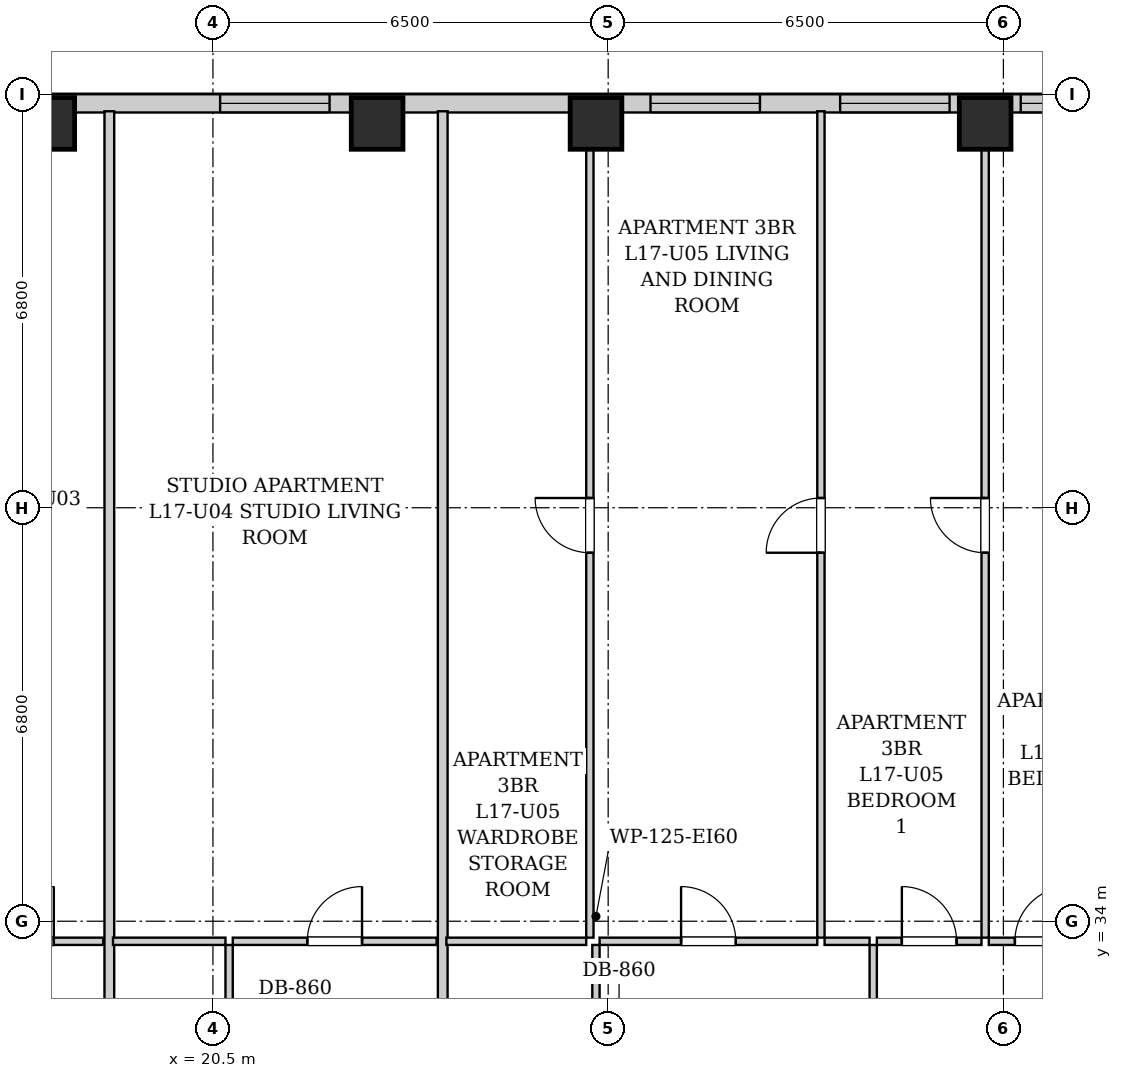
"""IFC4 building model, lengths in metres.
Left out: names, types, materials, properties, quantities, classifications, styles, units other than length and angle.
Written with IfcOpenShell. Run it as: python <this file> out.ifc"""

import sys

from ifc_helpers import new_model, si_unit, direction, frame, frame_2d, origin, origin_2d, place, context, subcontext, project, spatial, rectangle, extrude, element, fill, save


model = new_model("IFC4")
c1 = context("Model", 3, precision=1e-05, world=origin(), true_north=direction((0.0, 1.0)))
c2 = subcontext(c1, "Body", "Model", "MODEL_VIEW")
j1 = project(units=[si_unit("LENGTHUNIT", "METRE"), si_unit("PLANEANGLEUNIT", "RADIAN")], contexts=[c1])
p1 = place(None, origin())
s1 = spatial("IfcSite", under=j1, at=p1, CompositionType="ELEMENT")
p2 = place(p1, origin())
s2 = spatial("IfcBuilding", under=s1, at=p2, CompositionType="ELEMENT")
p3 = place(p2, frame((0.0, 0.0, 64.2)))
s3 = spatial("IfcBuildingStorey", under=s2, at=p3, CompositionType="ELEMENT", Elevation=64.2)
for number, where, z_axis, x_axis in (
    (1, (17.8, 47.12, 0.0), (0.0, 0.0, 1.0), (1.0, 0.0, 0.0)),
    (2, (23.2, 47.12, 0.0), (0.0, 0.0, 1.0), (1.0, 0.0, 0.0)),
    (3, (26.8, 47.12, 0.0), (0.0, 0.0, 1.0), (1.0, 0.0, 0.0)),
    (4, (33.2, 47.12, 0.0), (0.0, 0.0, 1.0), (1.0, 0.0, 0.0)),
):
    element("IfcColumn", number, at=place(p3, frame(where, z_axis=z_axis, x_axis=x_axis)), inside=s3, PredefinedType="COLUMN", context=c2, shape_type="SweptSolid", body=[
        extrude(rectangle(XDim=0.85, YDim=0.85, at=origin_2d()), origin(), (0.0, 0.0, 1.0), 3.2),
    ])
p4 = place(p3, frame((10.0, 47.45, 0.0), z_axis=(0.0, 0.0, 1.0), x_axis=(1.0, 0.0, 0.0)))
e5 = element("IfcWall", 5, at=p4, inside=s3, PredefinedType="SOLIDWALL", context=c2, shape_type="SweptSolid", body=[
    extrude(rectangle(XDim=26.35, YDim=0.3, at=frame_2d((13.175, 0.0))), origin(), (0.0, 0.0, 1.0), 1.975),
])
p5 = place(p4, frame((1.735, 0.0, 0.55)))
e6 = element("IfcOpeningElement", 6, at=p5, cuts=e5, PredefinedType="OPENING", context=c2, shape_type="SweptSolid", body=[
    extrude(rectangle(XDim=1.8, YDim=1.2, at=frame_2d((0.9, 0.6))), frame((0.0, 0.16, 0.0), z_axis=(0.0, -1.0, 0.0), x_axis=(1.0, 0.0, 0.0)), (0.0, 0.0, 1.0), 0.32),
])
p6 = place(p4, frame((5.415, 0.0, 0.55)))
e7 = element("IfcOpeningElement", 7, at=p6, cuts=e5, PredefinedType="OPENING", context=c2, shape_type="SweptSolid", body=[
    extrude(rectangle(XDim=1.8, YDim=1.2, at=frame_2d((0.9, 0.6))), frame((0.0, 0.16, 0.0), z_axis=(0.0, -1.0, 0.0), x_axis=(1.0, 0.0, 0.0)), (0.0, 0.0, 1.0), 0.32),
])
p7 = place(p4, frame((10.618, 0.0, 0.55)))
e8 = element("IfcOpeningElement", 8, at=p7, cuts=e5, PredefinedType="OPENING", context=c2, shape_type="SweptSolid", body=[
    extrude(rectangle(XDim=1.8, YDim=1.2, at=frame_2d((0.9, 0.6))), frame((0.0, 0.16, 0.0), z_axis=(0.0, -1.0, 0.0), x_axis=(1.0, 0.0, 0.0)), (0.0, 0.0, 1.0), 0.32),
])
p8 = place(p4, frame((17.696, 0.0, 0.55)))
e9 = element("IfcOpeningElement", 9, at=p8, cuts=e5, PredefinedType="OPENING", context=c2, shape_type="SweptSolid", body=[
    extrude(rectangle(XDim=1.8, YDim=1.2, at=frame_2d((0.9, 0.6))), frame((0.0, 0.16, 0.0), z_axis=(0.0, -1.0, 0.0), x_axis=(1.0, 0.0, 0.0)), (0.0, 0.0, 1.0), 0.32),
])
p9 = place(p4, frame((20.815, 0.0, 0.55)))
e10 = element("IfcOpeningElement", 10, at=p9, cuts=e5, PredefinedType="OPENING", context=c2, shape_type="SweptSolid", body=[
    extrude(rectangle(XDim=1.8, YDim=1.2, at=frame_2d((0.9, 0.6))), frame((0.0, 0.16, 0.0), z_axis=(0.0, -1.0, 0.0), x_axis=(1.0, 0.0, 0.0)), (0.0, 0.0, 1.0), 0.32),
])
p10 = place(p4, frame((23.785, 0.0, 0.55)))
e11 = element("IfcOpeningElement", 11, at=p10, cuts=e5, PredefinedType="OPENING", context=c2, shape_type="SweptSolid", body=[
    extrude(rectangle(XDim=1.35, YDim=1.2, at=frame_2d((0.675, 0.6))), frame((0.0, 0.16, 0.0), z_axis=(0.0, -1.0, 0.0), x_axis=(1.0, 0.0, 0.0)), (0.0, 0.0, 1.0), 0.32),
])
p11 = place(p3, frame((16.17, 33.67, 0.0), z_axis=(0.0, 0.0, 1.0), x_axis=(1.0, 0.0, 0.0)))
e12 = element("IfcWall", 12, at=p11, inside=s3, PredefinedType="PARTITIONING", context=c2, shape_type="SweptSolid", body=[
    extrude(rectangle(XDim=2.526, YDim=0.12, at=frame_2d((1.263, 0.0))), origin(), (0.0, 0.0, 1.0), 2.94),
])
p12 = place(p11, frame((0.813, 0.0, 0.0)))
e13 = element("IfcOpeningElement", 13, at=p12, cuts=e12, PredefinedType="OPENING", context=c2, shape_type="SweptSolid", body=[
    extrude(rectangle(XDim=0.9, YDim=2.05, at=frame_2d((0.45, 1.025))), frame((0.0, 0.07, 0.0), z_axis=(0.0, -1.0, 0.0), x_axis=(1.0, 0.0, 0.0)), (0.0, 0.0, 1.0), 0.14),
])
p13 = place(p3, frame((18.796, 30.76, 0.0), z_axis=(0.0, 0.0, 1.0), x_axis=(0.0, 1.0, 0.0)))
e14 = element("IfcWall", 14, at=p13, inside=s3, PredefinedType="PARTITIONING", context=c2, shape_type="SweptSolid", body=[
    extrude(rectangle(XDim=16.56, YDim=0.16, at=frame_2d((8.28, 0.0))), origin(), (0.0, 0.0, 1.0), 2.94),
])
p14 = place(p3, frame((20.766, 30.76, 0.0), z_axis=(0.0, 0.0, 1.0), x_axis=(0.0, 1.0, 0.0)))
e15 = element("IfcWall", 15, at=p14, inside=s3, PredefinedType="PARTITIONING", context=c2, shape_type="SweptSolid", body=[
    extrude(rectangle(XDim=2.85, YDim=0.12, at=frame_2d((1.425, 0.0))), origin(), (0.0, 0.0, 1.0), 2.94),
])
p15 = place(p14, frame((0.995, 0.0, 0.0)))
e16 = element("IfcOpeningElement", 16, at=p15, cuts=e15, PredefinedType="OPENING", context=c2, shape_type="SweptSolid", body=[
    extrude(rectangle(XDim=0.86, YDim=2.05, at=frame_2d((0.43, 1.025))), frame((0.0, 0.07, 0.0), z_axis=(0.0, -1.0, 0.0), x_axis=(1.0, 0.0, 0.0)), (0.0, 0.0, 1.0), 0.14),
])
p16 = place(p3, frame((18.856, 33.67, 0.0), z_axis=(0.0, 0.0, 1.0), x_axis=(1.0, 0.0, 0.0)))
e17 = element("IfcWall", 17, at=p16, inside=s3, PredefinedType="PARTITIONING", context=c2, shape_type="SweptSolid", body=[
    extrude(rectangle(XDim=1.85, YDim=0.12, at=frame_2d((0.925, 0.0))), origin(), (0.0, 0.0, 1.0), 2.94),
])
p17 = place(p3, frame((20.826, 33.67, 0.0), z_axis=(0.0, 0.0, 1.0), x_axis=(1.0, 0.0, 0.0)))
e18 = element("IfcWall", 18, at=p17, inside=s3, PredefinedType="PARTITIONING", context=c2, shape_type="SweptSolid", body=[
    extrude(rectangle(XDim=3.353, YDim=0.12, at=frame_2d((1.677, 0.0))), origin(), (0.0, 0.0, 1.0), 2.94),
])
p18 = place(p17, frame((1.226, 0.0, 0.0)))
e19 = element("IfcOpeningElement", 19, at=p18, cuts=e18, PredefinedType="OPENING", context=c2, shape_type="SweptSolid", body=[
    extrude(rectangle(XDim=0.9, YDim=2.05, at=frame_2d((0.45, 1.025))), frame((0.0, 0.07, 0.0), z_axis=(0.0, -1.0, 0.0), x_axis=(1.0, 0.0, 0.0)), (0.0, 0.0, 1.0), 0.14),
])
p19 = place(p3, frame((24.279, 30.76, 0.0), z_axis=(0.0, 0.0, 1.0), x_axis=(0.0, 1.0, 0.0)))
e20 = element("IfcWall", 20, at=p19, inside=s3, PredefinedType="PARTITIONING", context=c2, shape_type="SweptSolid", body=[
    extrude(rectangle(XDim=16.56, YDim=0.16, at=frame_2d((8.28, 0.0))), origin(), (0.0, 0.0, 1.0), 2.94),
])
p20 = place(p3, frame((26.799, 30.76, 0.0), z_axis=(0.0, 0.0, 1.0), x_axis=(0.0, 1.0, 0.0)))
e21 = element("IfcWall", 21, at=p20, inside=s3, PredefinedType="PARTITIONING", context=c2, shape_type="SweptSolid", body=[
    extrude(rectangle(XDim=2.85, YDim=0.12, at=frame_2d((1.425, 0.0))), origin(), (0.0, 0.0, 1.0), 2.94),
])
p21 = place(p20, frame((0.995, 0.0, 0.0)))
e22 = element("IfcOpeningElement", 22, at=p21, cuts=e21, PredefinedType="OPENING", context=c2, shape_type="SweptSolid", body=[
    extrude(rectangle(XDim=0.86, YDim=2.05, at=frame_2d((0.43, 1.025))), frame((0.0, 0.07, 0.0), z_axis=(0.0, -1.0, 0.0), x_axis=(1.0, 0.0, 0.0)), (0.0, 0.0, 1.0), 0.14),
])
p22 = place(p3, frame((24.339, 33.67, 0.0), z_axis=(0.0, 0.0, 1.0), x_axis=(1.0, 0.0, 0.0)))
e23 = element("IfcWall", 23, at=p22, inside=s3, PredefinedType="PARTITIONING", context=c2, shape_type="SweptSolid", body=[
    extrude(rectangle(XDim=2.3, YDim=0.12, at=frame_2d((1.15, 0.0))), origin(), (0.0, 0.0, 1.0), 2.94),
])
p23 = place(p3, frame((31.359, 30.76, 0.0), z_axis=(0.0, 0.0, 1.0), x_axis=(0.0, 1.0, 0.0)))
e24 = element("IfcWall", 24, at=p23, inside=s3, PredefinedType="PARTITIONING", context=c2, shape_type="SweptSolid", body=[
    extrude(rectangle(XDim=2.85, YDim=0.12, at=frame_2d((1.425, 0.0))), origin(), (0.0, 0.0, 1.0), 2.94),
])
p24 = place(p23, frame((0.975, 0.0, 0.0)))
e25 = element("IfcOpeningElement", 25, at=p24, cuts=e24, PredefinedType="OPENING", context=c2, shape_type="SweptSolid", body=[
    extrude(rectangle(XDim=0.9, YDim=2.05, at=frame_2d((0.45, 1.025))), frame((0.0, 0.07, 0.0), z_axis=(0.0, -1.0, 0.0), x_axis=(1.0, 0.0, 0.0)), (0.0, 0.0, 1.0), 0.14),
])
p25 = place(p3, frame((26.859, 33.67, 0.0), z_axis=(0.0, 0.0, 1.0), x_axis=(1.0, 0.0, 0.0)))
e26 = element("IfcWall", 26, at=p25, inside=s3, PredefinedType="PARTITIONING", context=c2, shape_type="SweptSolid", body=[
    extrude(rectangle(XDim=3.58, YDim=0.12, at=frame_2d((1.79, 0.0))), origin(), (0.0, 0.0, 1.0), 2.94),
])
p26 = place(p25, frame((1.34, 0.0, 0.0)))
e27 = element("IfcOpeningElement", 27, at=p26, cuts=e26, PredefinedType="OPENING", context=c2, shape_type="SweptSolid", body=[
    extrude(rectangle(XDim=0.9, YDim=2.05, at=frame_2d((0.45, 1.025))), frame((0.0, 0.07, 0.0), z_axis=(0.0, -1.0, 0.0), x_axis=(1.0, 0.0, 0.0)), (0.0, 0.0, 1.0), 0.14),
])
p27 = place(p3, frame((30.559, 33.67, 0.0), z_axis=(0.0, 0.0, 1.0), x_axis=(1.0, 0.0, 0.0)))
e28 = element("IfcWall", 28, at=p27, inside=s3, PredefinedType="PARTITIONING", context=c2, shape_type="SweptSolid", body=[
    extrude(rectangle(XDim=0.74, YDim=0.12, at=frame_2d((0.37, 0.0))), origin(), (0.0, 0.0, 1.0), 2.94),
])
p28 = place(p3, frame((31.419, 33.67, 0.0), z_axis=(0.0, 0.0, 1.0), x_axis=(1.0, 0.0, 0.0)))
e29 = element("IfcWall", 29, at=p28, inside=s3, PredefinedType="PARTITIONING", context=c2, shape_type="SweptSolid", body=[
    extrude(rectangle(XDim=1.721, YDim=0.12, at=frame_2d((0.86, 0.0))), origin(), (0.0, 0.0, 1.0), 2.94),
])
p29 = place(p28, frame((0.411, 0.0, 0.0)))
e30 = element("IfcOpeningElement", 30, at=p29, cuts=e29, PredefinedType="OPENING", context=c2, shape_type="SweptSolid", body=[
    extrude(rectangle(XDim=0.9, YDim=2.05, at=frame_2d((0.45, 1.025))), frame((0.0, 0.07, 0.0), z_axis=(0.0, -1.0, 0.0), x_axis=(1.0, 0.0, 0.0)), (0.0, 0.0, 1.0), 0.14),
])
p30 = place(p3, frame((33.26, 33.67, 0.0), z_axis=(0.0, 0.0, 1.0), x_axis=(1.0, 0.0, 0.0)))
e31 = element("IfcWall", 31, at=p30, inside=s3, PredefinedType="PARTITIONING", context=c2, shape_type="SweptSolid", body=[
    extrude(rectangle(XDim=1.759, YDim=0.12, at=frame_2d((0.879, 0.0))), origin(), (0.0, 0.0, 1.0), 2.94),
])
p31 = place(p30, frame((0.429, 0.0, 0.0)))
e32 = element("IfcOpeningElement", 32, at=p31, cuts=e31, PredefinedType="OPENING", context=c2, shape_type="SweptSolid", body=[
    extrude(rectangle(XDim=0.9, YDim=2.05, at=frame_2d((0.45, 1.025))), frame((0.0, 0.07, 0.0), z_axis=(0.0, -1.0, 0.0), x_axis=(1.0, 0.0, 0.0)), (0.0, 0.0, 1.0), 0.14),
])
p32 = place(p3, frame((26.699, 33.73, 0.0), z_axis=(0.0, 0.0, 1.0), x_axis=(0.0, 1.0, 0.0)))
e33 = element("IfcWall", 33, at=p32, inside=s3, PredefinedType="PARTITIONING", context=c2, shape_type="SweptSolid", body=[
    extrude(rectangle(XDim=13.59, YDim=0.12, at=frame_2d((6.795, 0.0))), origin(), (0.0, 0.0, 1.0), 2.94),
])
p33 = place(p32, frame((6.33, 0.0, 0.0)))
e34 = element("IfcOpeningElement", 34, at=p33, cuts=e33, PredefinedType="OPENING", context=c2, shape_type="SweptSolid", body=[
    extrude(rectangle(XDim=0.9, YDim=2.05, at=frame_2d((0.45, 1.025))), frame((0.0, 0.07, 0.0), z_axis=(0.0, -1.0, 0.0), x_axis=(1.0, 0.0, 0.0)), (0.0, 0.0, 1.0), 0.14),
])
p34 = place(p3, frame((30.499, 33.73, 0.0), z_axis=(0.0, 0.0, 1.0), x_axis=(0.0, 1.0, 0.0)))
e35 = element("IfcWall", 35, at=p34, inside=s3, PredefinedType="PARTITIONING", context=c2, shape_type="SweptSolid", body=[
    extrude(rectangle(XDim=13.59, YDim=0.12, at=frame_2d((6.795, 0.0))), origin(), (0.0, 0.0, 1.0), 2.94),
])
p35 = place(p34, frame((6.33, 0.0, 0.0)))
e36 = element("IfcOpeningElement", 36, at=p35, cuts=e35, PredefinedType="OPENING", context=c2, shape_type="SweptSolid", body=[
    extrude(rectangle(XDim=0.9, YDim=2.05, at=frame_2d((0.45, 1.025))), frame((0.0, 0.07, 0.0), z_axis=(0.0, -1.0, 0.0), x_axis=(1.0, 0.0, 0.0)), (0.0, 0.0, 1.0), 0.14),
])
p36 = place(p3, frame((33.2, 33.73, 0.0), z_axis=(0.0, 0.0, 1.0), x_axis=(0.0, 1.0, 0.0)))
e37 = element("IfcWall", 37, at=p36, inside=s3, PredefinedType="PARTITIONING", context=c2, shape_type="SweptSolid", body=[
    extrude(rectangle(XDim=13.59, YDim=0.12, at=frame_2d((6.795, 0.0))), origin(), (0.0, 0.0, 1.0), 2.232),
])
p37 = place(p36, frame((6.33, 0.0, 0.0)))
e38 = element("IfcOpeningElement", 38, at=p37, cuts=e37, PredefinedType="OPENING", context=c2, shape_type="SweptSolid", body=[
    extrude(rectangle(XDim=0.9, YDim=2.05, at=frame_2d((0.45, 1.025))), frame((0.0, 0.07, 0.0), z_axis=(0.0, -1.0, 0.0), x_axis=(1.0, 0.0, 0.0)), (0.0, 0.0, 1.0), 0.14),
])
p38 = place(p12, origin())
e39 = element("IfcDoor", 39, at=p38, inside=s3, OperationType="SINGLE_SWING_RIGHT", PredefinedType="DOOR", context=c2, shape_type="SweptSolid", body=[
    extrude(rectangle(XDim=0.9, YDim=2.05, at=frame_2d((0.45, 1.025))), frame((0.0, 0.025, 0.0), z_axis=(0.0, -1.0, 0.0), x_axis=(1.0, 0.0, 0.0)), (0.0, 0.0, 1.0), 0.05),
])
fill(e13, e39)
p39 = place(p18, origin())
e40 = element("IfcDoor", 40, at=p39, inside=s3, OperationType="SINGLE_SWING_RIGHT", PredefinedType="DOOR", context=c2, shape_type="SweptSolid", body=[
    extrude(rectangle(XDim=0.9, YDim=2.05, at=frame_2d((0.45, 1.025))), frame((0.0, 0.025, 0.0), z_axis=(0.0, -1.0, 0.0), x_axis=(1.0, 0.0, 0.0)), (0.0, 0.0, 1.0), 0.05),
])
fill(e19, e40)
p40 = place(p26, origin())
e41 = element("IfcDoor", 41, at=p40, inside=s3, OperationType="SINGLE_SWING_LEFT", PredefinedType="DOOR", context=c2, shape_type="SweptSolid", body=[
    extrude(rectangle(XDim=0.9, YDim=2.05, at=frame_2d((0.45, 1.025))), frame((0.0, 0.025, 0.0), z_axis=(0.0, -1.0, 0.0), x_axis=(1.0, 0.0, 0.0)), (0.0, 0.0, 1.0), 0.05),
])
fill(e27, e41)
p41 = place(p29, origin())
e42 = element("IfcDoor", 42, at=p41, inside=s3, OperationType="SINGLE_SWING_LEFT", PredefinedType="DOOR", context=c2, shape_type="SweptSolid", body=[
    extrude(rectangle(XDim=0.9, YDim=2.05, at=frame_2d((0.45, 1.025))), frame((0.0, 0.025, 0.0), z_axis=(0.0, -1.0, 0.0), x_axis=(1.0, 0.0, 0.0)), (0.0, 0.0, 1.0), 0.05),
])
fill(e30, e42)
p42 = place(p31, origin())
e43 = element("IfcDoor", 43, at=p42, inside=s3, OperationType="SINGLE_SWING_RIGHT", PredefinedType="DOOR", context=c2, shape_type="SweptSolid", body=[
    extrude(rectangle(XDim=0.9, YDim=2.05, at=frame_2d((0.45, 1.025))), frame((0.0, 0.025, 0.0), z_axis=(0.0, -1.0, 0.0), x_axis=(1.0, 0.0, 0.0)), (0.0, 0.0, 1.0), 0.05),
])
fill(e32, e43)
p43 = place(p33, origin())
e44 = element("IfcDoor", 44, at=p43, inside=s3, OperationType="SINGLE_SWING_RIGHT", PredefinedType="DOOR", context=c2, shape_type="SweptSolid", body=[
    extrude(rectangle(XDim=0.9, YDim=2.05, at=frame_2d((0.45, 1.025))), frame((0.0, 0.025, 0.0), z_axis=(0.0, -1.0, 0.0), x_axis=(1.0, 0.0, 0.0)), (0.0, 0.0, 1.0), 0.05),
])
fill(e34, e44)
p44 = place(p35, origin())
e45 = element("IfcDoor", 45, at=p44, inside=s3, OperationType="SINGLE_SWING_LEFT", PredefinedType="DOOR", context=c2, shape_type="SweptSolid", body=[
    extrude(rectangle(XDim=0.9, YDim=2.05, at=frame_2d((0.45, 1.025))), frame((0.0, 0.025, 0.0), z_axis=(0.0, -1.0, 0.0), x_axis=(1.0, 0.0, 0.0)), (0.0, 0.0, 1.0), 0.05),
])
fill(e36, e45)
p45 = place(p37, origin())
e46 = element("IfcDoor", 46, at=p45, inside=s3, OperationType="SINGLE_SWING_RIGHT", PredefinedType="DOOR", context=c2, shape_type="SweptSolid", body=[
    extrude(rectangle(XDim=0.9, YDim=2.05, at=frame_2d((0.45, 1.025))), frame((0.0, 0.025, 0.0), z_axis=(0.0, -1.0, 0.0), x_axis=(1.0, 0.0, 0.0)), (0.0, 0.0, 1.0), 0.05),
])
fill(e38, e46)
p46 = place(p7, origin())
e47 = element("IfcWindow", 47, at=p46, inside=s3, PartitioningType="DOUBLE_PANEL_VERTICAL", PredefinedType="WINDOW", context=c2, shape_type="SweptSolid", body=[
    extrude(rectangle(XDim=1.8, YDim=1.2, at=frame_2d((0.9, 0.6))), frame((0.0, 0.03, 0.0), z_axis=(0.0, -1.0, 0.0), x_axis=(1.0, 0.0, 0.0)), (0.0, 0.0, 1.0), 0.06),
])
fill(e8, e47)
p47 = place(p8, origin())
e48 = element("IfcWindow", 48, at=p47, inside=s3, PartitioningType="DOUBLE_PANEL_VERTICAL", PredefinedType="WINDOW", context=c2, shape_type="SweptSolid", body=[
    extrude(rectangle(XDim=1.8, YDim=1.2, at=frame_2d((0.9, 0.6))), frame((0.0, 0.03, 0.0), z_axis=(0.0, -1.0, 0.0), x_axis=(1.0, 0.0, 0.0)), (0.0, 0.0, 1.0), 0.06),
])
fill(e9, e48)
p48 = place(p9, origin())
e49 = element("IfcWindow", 49, at=p48, inside=s3, PartitioningType="DOUBLE_PANEL_VERTICAL", PredefinedType="WINDOW", context=c2, shape_type="SweptSolid", body=[
    extrude(rectangle(XDim=1.8, YDim=1.2, at=frame_2d((0.9, 0.6))), frame((0.0, 0.03, 0.0), z_axis=(0.0, -1.0, 0.0), x_axis=(1.0, 0.0, 0.0)), (0.0, 0.0, 1.0), 0.06),
])
fill(e10, e49)
p49 = place(p10, origin())
e50 = element("IfcWindow", 50, at=p49, inside=s3, PartitioningType="SINGLE_PANEL", PredefinedType="WINDOW", context=c2, shape_type="SweptSolid", body=[
    extrude(rectangle(XDim=1.35, YDim=1.2, at=frame_2d((0.675, 0.6))), frame((0.0, 0.03, 0.0), z_axis=(0.0, -1.0, 0.0), x_axis=(1.0, 0.0, 0.0)), (0.0, 0.0, 1.0), 0.06),
])
fill(e11, e50)
save(model, sys.argv[1])
